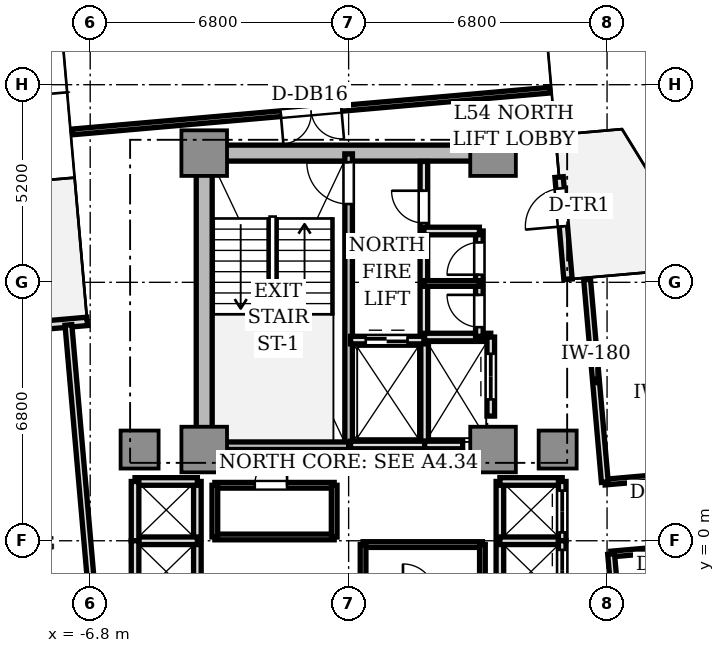
"""IFC4 building model, lengths in metres.
Left out: names, types, materials, properties, quantities, classifications, styles, units other than length and angle.
Written with IfcOpenShell. Run it as: python <this file> out.ifc"""

import sys

from ifc_helpers import new_model, si_unit, direction, frame, frame_2d, origin, origin_2d, place, context, subcontext, project, spatial, rectangle, extrude, source, transform, mapped, element, fill, save


model = new_model("IFC4")
c1 = context("Model", 3, precision=1e-05, world=origin(), true_north=direction((0.0, 1.0)))
c2 = subcontext(c1, "Body", "Model", "MODEL_VIEW")
j1 = project(units=[si_unit("LENGTHUNIT", "METRE"), si_unit("PLANEANGLEUNIT", "RADIAN")], contexts=[c1])
p1 = place(None, origin())
s1 = spatial("IfcSite", under=j1, at=p1, CompositionType="ELEMENT")
p2 = place(p1, origin())
s2 = spatial("IfcBuilding", under=s1, at=p2, CompositionType="ELEMENT")
p3 = place(p2, frame((0.0, 0.0, 195.3)))
s3 = spatial("IfcBuildingStorey", under=s2, at=p3, CompositionType="ELEMENT", Elevation=195.3)
p4 = place(p3, frame((-3.55, 10.2, 0.0), z_axis=(0.0, 0.0, 1.0), x_axis=(1.0, 0.0, 0.0)))
e1 = element("IfcWall", 1, at=p4, inside=s3, PredefinedType="SHEAR", context=c2, shape_type="SweptSolid", body=[
    extrude(rectangle(XDim=7.1, YDim=0.42, at=frame_2d((3.55, 0.0))), origin(), (0.0, 0.0, 1.0), 3.11),
])
p5 = place(p3, frame((-3.8, 2.85, 0.0), z_axis=(0.0, 0.0, 1.0), x_axis=(0.0, 1.0, 0.0)))
e2 = element("IfcWall", 2, at=p5, inside=s3, PredefinedType="SHEAR", context=c2, shape_type="SweptSolid", body=[
    extrude(rectangle(XDim=6.9, YDim=0.42, at=frame_2d((3.45, 0.0))), origin(), (0.0, 0.0, 1.0), 3.11),
])
m1 = source(origin(), c2, "Body", "SweptSolid", [
    extrude(rectangle(XDim=1.2, YDim=1.2, at=origin_2d()), origin(), (0.0, 0.0, 1.0), 3.11),
])
for number, where, z_axis, x_axis in (
    (3, (-3.8, 2.4, 0.0), (0.0, 0.0, 1.0), (1.0, 0.0, 0.0)),
    (4, (3.8, 2.4, 0.0), (0.0, 0.0, 1.0), (1.0, 0.0, 0.0)),
    (5, (-3.8, 10.2, 0.0), (0.0, 0.0, 1.0), (1.0, 0.0, 0.0)),
    (6, (3.8, 10.2, 0.0), (0.0, 0.0, 1.0), (1.0, 0.0, 0.0)),
):
    element("IfcColumn", number, at=place(p3, frame(where, z_axis=z_axis, x_axis=x_axis)), inside=s3, PredefinedType="COLUMN", context=c2, shape_type="MappedRepresentation", body=[
        mapped(m1, transform((0.0, 0.0, 0.0), scale=1.0)),
    ])
m2 = source(origin(), c2, "Body", "SweptSolid", [
    extrude(rectangle(XDim=1.0, YDim=1.0, at=origin_2d()), origin(), (0.0, 0.0, 1.0), 3.11),
])
for number, where, z_axis, x_axis in (
    (7, (5.5, 2.4, 0.0), (0.0, 0.0, 1.0), (1.0, 0.0, 0.0)),
    (8, (-5.5, 2.4, 0.0), (0.0, 0.0, 1.0), (1.0, 0.0, 0.0)),
):
    element("IfcColumn", number, at=place(p3, frame(where, z_axis=z_axis, x_axis=x_axis)), inside=s3, PredefinedType="COLUMN", context=c2, shape_type="MappedRepresentation", body=[
        mapped(m2, transform((0.0, 0.0, 0.0), scale=1.0)),
    ])
p6 = place(p3, frame((5.772, 6.879, 0.0), z_axis=(0.0, 0.0, 1.0), x_axis=(-0.087168071984, 0.996193619346, 0.0)))
e9 = element("IfcWall", 9, at=p6, inside=s3, PredefinedType="STANDARD", context=c2, shape_type="SweptSolid", body=[
    extrude(rectangle(XDim=2.7, YDim=0.22, at=frame_2d((1.35, 0.0))), origin(), (0.0, 0.0, 1.0), 3.11),
])
p7 = place(p6, frame((1.4, 0.0, 0.0)))
e10 = element("IfcOpeningElement", 10, at=p7, cuts=e9, PredefinedType="OPENING", context=c2, shape_type="SweptSolid", body=[
    extrude(rectangle(XDim=1.0, YDim=2.2, at=frame_2d((0.5, 1.1))), frame((0.0, 0.12, 0.0), z_axis=(0.0, -1.0, 0.0), x_axis=(1.0, 0.0, 0.0)), (0.0, 0.0, 1.0), 0.24),
])
p8 = place(p3, frame((-6.879, 5.772, 0.0), z_axis=(0.0, 0.0, 1.0), x_axis=(-0.996193619346, -0.087168071984, 0.0)))
e11 = element("IfcWall", 11, at=p8, inside=s3, PredefinedType="STANDARD", context=c2, shape_type="SweptSolid", body=[
    extrude(rectangle(XDim=2.7, YDim=0.22, at=frame_2d((1.35, 0.0))), origin(), (0.0, 0.0, 1.0), 3.11),
])
p9 = place(p8, frame((1.4, 0.0, 0.0)))
e12 = element("IfcOpeningElement", 12, at=p9, cuts=e11, PredefinedType="OPENING", context=c2, shape_type="SweptSolid", body=[
    extrude(rectangle(XDim=1.0, YDim=2.2, at=frame_2d((0.5, 1.1))), frame((0.0, 0.12, 0.0), z_axis=(0.0, -1.0, 0.0), x_axis=(1.0, 0.0, 0.0)), (0.0, 0.0, 1.0), 0.24),
])
p10 = place(p3, frame((0.0, 2.5, 0.0), z_axis=(0.0, 0.0, 1.0), x_axis=(0.0, 1.0, 0.0)))
e13 = element("IfcWall", 13, at=p10, inside=s3, PredefinedType="SOLIDWALL", context=c2, shape_type="SweptSolid", body=[
    extrude(rectangle(XDim=7.68, YDim=0.2, at=frame_2d((3.84, 0.0))), origin(), (0.0, 0.0, 1.0), 3.11),
])
p11 = place(p10, frame((6.36, 0.0, 0.0)))
e14 = element("IfcOpeningElement", 14, at=p11, cuts=e13, PredefinedType="OPENING", context=c2, shape_type="SweptSolid", body=[
    extrude(rectangle(XDim=1.1, YDim=2.15, at=frame_2d((0.55, 1.075))), frame((0.0, 0.11, 0.0), z_axis=(0.0, -1.0, 0.0), x_axis=(1.0, 0.0, 0.0)), (0.0, 0.0, 1.0), 0.22),
])
p12 = place(p3, frame((-3.72, 2.5, 0.0), z_axis=(0.0, 0.0, 1.0), x_axis=(1.0, 0.0, 0.0)))
e15 = element("IfcWall", 15, at=p12, inside=s3, PredefinedType="SOLIDWALL", context=c2, shape_type="SweptSolid", body=[
    extrude(rectangle(XDim=3.72, YDim=0.2, at=frame_2d((1.86, 0.0))), origin(), (0.0, 0.0, 1.0), 3.11),
])
p13 = place(p3, frame((1.98, 5.32, 0.0), z_axis=(0.0, 0.0, 1.0), x_axis=(0.0, 1.0, 0.0)))
e16 = element("IfcWall", 16, at=p13, inside=s3, PredefinedType="SOLIDWALL", context=c2, shape_type="SweptSolid", body=[
    extrude(rectangle(XDim=4.66, YDim=0.2, at=frame_2d((2.33, 0.0))), origin(), (0.0, 0.0, 1.0), 2.66),
])
p14 = place(p13, frame((3.04, 0.0, 0.0)))
e17 = element("IfcOpeningElement", 17, at=p14, cuts=e16, PredefinedType="OPENING", context=c2, shape_type="SweptSolid", body=[
    extrude(rectangle(XDim=0.85, YDim=2.1, at=frame_2d((0.425, 1.05))), frame((0.0, 0.11, 0.0), z_axis=(0.0, -1.0, 0.0), x_axis=(1.0, 0.0, 0.0)), (0.0, 0.0, 1.0), 0.22),
])
p15 = place(p3, frame((2.0, 2.5, 0.0), z_axis=(0.0, 0.0, 1.0), x_axis=(0.0, 1.0, 0.0)))
e18 = element("IfcWall", 18, at=p15, inside=s3, PredefinedType="SOLIDWALL", context=c2, shape_type="SweptSolid", body=[
    extrude(rectangle(XDim=2.78, YDim=0.2, at=frame_2d((1.39, 0.0))), origin(), (0.0, 0.0, 1.0), 2.66),
])
p16 = place(p3, frame((0.05, 2.52, 0.0), z_axis=(0.0, 0.0, 1.0), x_axis=(1.0, 0.0, 0.0)))
e19 = element("IfcWall", 19, at=p16, inside=s3, PredefinedType="SOLIDWALL", context=c2, shape_type="SweptSolid", body=[
    extrude(rectangle(XDim=1.95, YDim=0.2, at=frame_2d((0.975, 0.0))), origin(), (0.0, 0.0, 1.0), 2.66),
])
p17 = place(p3, frame((0.05, 5.28, 0.0), z_axis=(0.0, 0.0, 1.0), x_axis=(1.0, 0.0, 0.0)))
e20 = element("IfcWall", 20, at=p17, inside=s3, PredefinedType="SOLIDWALL", context=c2, shape_type="SweptSolid", body=[
    extrude(rectangle(XDim=1.93, YDim=0.2, at=frame_2d((0.965, 0.0))), origin(), (0.0, 0.0, 1.0), 2.66),
])
p18 = place(p17, frame((0.4, 0.0, 0.0)))
e21 = element("IfcOpeningElement", 21, at=p18, cuts=e20, PredefinedType="OPENING", context=c2, shape_type="SweptSolid", body=[
    extrude(rectangle(XDim=1.1, YDim=2.2, at=frame_2d((0.55, 1.1))), frame((0.0, 0.11, 0.0), z_axis=(0.0, -1.0, 0.0), x_axis=(1.0, 0.0, 0.0)), (0.0, 0.0, 1.0), 0.22),
])
p19 = place(p3, frame((2.0, 2.52, 0.0), z_axis=(0.0, 0.0, 1.0), x_axis=(1.0, 0.0, 0.0)))
e22 = element("IfcWall", 22, at=p19, inside=s3, PredefinedType="SOLIDWALL", context=c2, shape_type="SweptSolid", body=[
    extrude(rectangle(XDim=1.0, YDim=0.2, at=frame_2d((0.5, 0.0))), origin(), (0.0, 0.0, 1.0), 2.66),
])
p20 = place(p3, frame((2.0, 5.36, 0.0), z_axis=(0.0, 0.0, 1.0), x_axis=(1.0, 0.0, 0.0)))
e23 = element("IfcWall", 23, at=p20, inside=s3, PredefinedType="SOLIDWALL", context=c2, shape_type="SweptSolid", body=[
    extrude(rectangle(XDim=1.74, YDim=0.2, at=frame_2d((0.87, 0.0))), origin(), (0.0, 0.0, 1.0), 2.66),
])
p21 = place(p3, frame((3.74, 3.28, 0.0), z_axis=(0.0, 0.0, 1.0), x_axis=(0.0, 1.0, 0.0)))
e24 = element("IfcWall", 24, at=p21, inside=s3, PredefinedType="SOLIDWALL", context=c2, shape_type="SweptSolid", body=[
    extrude(rectangle(XDim=2.08, YDim=0.2, at=frame_2d((1.04, 0.0))), origin(), (0.0, 0.0, 1.0), 2.66),
])
p22 = place(p21, frame((0.44, 0.0, 0.0)))
e25 = element("IfcOpeningElement", 25, at=p22, cuts=e24, PredefinedType="OPENING", context=c2, shape_type="SweptSolid", body=[
    extrude(rectangle(XDim=1.2, YDim=2.2, at=frame_2d((0.6, 1.1))), frame((0.0, 0.11, 0.0), z_axis=(0.0, -1.0, 0.0), x_axis=(1.0, 0.0, 0.0)), (0.0, 0.0, 1.0), 0.22),
])
p23 = place(p3, frame((3.98, -1.56, 0.0), z_axis=(0.0, 0.0, 1.0), x_axis=(0.0, 1.0, 0.0)))
e26 = element("IfcWall", 26, at=p23, inside=s3, PredefinedType="SOLIDWALL", context=c2, shape_type="SweptSolid", body=[
    extrude(rectangle(XDim=3.12, YDim=0.2, at=frame_2d((1.56, 0.0))), origin(), (0.0, 0.0, 1.0), 2.28),
])
for number, where, z_axis, x_axis in (
    (27, (3.98, 1.56, 0.0), (0.0, 0.0, 1.0), (1.0, 0.0, 0.0)),
    (28, (3.98, 0.0, 0.0), (0.0, 0.0, 1.0), (1.0, 0.0, 0.0)),
):
    element("IfcWall", number, at=place(p3, frame(where, z_axis=z_axis, x_axis=x_axis)), inside=s3, PredefinedType="SOLIDWALL", context=c2, shape_type="SweptSolid", body=[
        extrude(rectangle(XDim=1.64, YDim=0.2, at=frame_2d((0.82, 0.0))), origin(), (0.0, 0.0, 1.0), 2.66),
    ])
p24 = place(p3, frame((5.62, 0.0, 0.0), z_axis=(0.0, 0.0, 1.0), x_axis=(0.0, 1.0, 0.0)))
e29 = element("IfcWall", 29, at=p24, inside=s3, PredefinedType="SOLIDWALL", context=c2, shape_type="SweptSolid", body=[
    extrude(rectangle(XDim=1.56, YDim=0.2, at=frame_2d((0.78, 0.0))), origin(), (0.0, 0.0, 1.0), 2.66),
])
p25 = place(p24, frame((0.22, 0.0, 0.0)))
e30 = element("IfcOpeningElement", 30, at=p25, cuts=e29, PredefinedType="OPENING", context=c2, shape_type="SweptSolid", body=[
    extrude(rectangle(XDim=1.1, YDim=2.2, at=frame_2d((0.55, 1.1))), frame((0.0, 0.11, 0.0), z_axis=(0.0, -1.0, 0.0), x_axis=(1.0, 0.0, 0.0)), (0.0, 0.0, 1.0), 0.22),
])
p26 = place(p3, frame((5.62, -1.56, 0.0), z_axis=(0.0, 0.0, 1.0), x_axis=(0.0, 1.0, 0.0)))
e31 = element("IfcWall", 31, at=p26, inside=s3, PredefinedType="SOLIDWALL", context=c2, shape_type="SweptSolid", body=[
    extrude(rectangle(XDim=1.56, YDim=0.2, at=frame_2d((0.78, 0.0))), origin(), (0.0, 0.0, 1.0), 2.66),
])
p27 = place(p26, frame((0.22, 0.0, 0.0)))
e32 = element("IfcOpeningElement", 32, at=p27, cuts=e31, PredefinedType="OPENING", context=c2, shape_type="SweptSolid", body=[
    extrude(rectangle(XDim=1.1, YDim=2.2, at=frame_2d((0.55, 1.1))), frame((0.0, 0.11, 0.0), z_axis=(0.0, -1.0, 0.0), x_axis=(1.0, 0.0, 0.0)), (0.0, 0.0, 1.0), 0.22),
])
p28 = place(p3, frame((-3.98, -1.56, 0.0), z_axis=(0.0, 0.0, 1.0), x_axis=(0.0, 1.0, 0.0)))
e33 = element("IfcWall", 33, at=p28, inside=s3, PredefinedType="SOLIDWALL", context=c2, shape_type="SweptSolid", body=[
    extrude(rectangle(XDim=3.12, YDim=0.2, at=frame_2d((1.56, 0.0))), origin(), (0.0, 0.0, 1.0), 2.28),
])
for number, where, z_axis, x_axis in (
    (34, (-5.62, 1.56, 0.0), (0.0, 0.0, 1.0), (1.0, 0.0, 0.0)),
    (35, (-5.62, 0.0, 0.0), (0.0, 0.0, 1.0), (1.0, 0.0, 0.0)),
):
    element("IfcWall", number, at=place(p3, frame(where, z_axis=z_axis, x_axis=x_axis)), inside=s3, PredefinedType="SOLIDWALL", context=c2, shape_type="SweptSolid", body=[
        extrude(rectangle(XDim=1.64, YDim=0.2, at=frame_2d((0.82, 0.0))), origin(), (0.0, 0.0, 1.0), 2.66),
    ])
for number, where, z_axis, x_axis in (
    (36, (-5.62, 0.0, 0.0), (0.0, 0.0, 1.0), (0.0, 1.0, 0.0)),
    (37, (-5.62, -1.56, 0.0), (0.0, 0.0, 1.0), (0.0, 1.0, 0.0)),
):
    element("IfcWall", number, at=place(p3, frame(where, z_axis=z_axis, x_axis=x_axis)), inside=s3, PredefinedType="SOLIDWALL", context=c2, shape_type="SweptSolid", body=[
        extrude(rectangle(XDim=1.56, YDim=0.2, at=frame_2d((0.78, 0.0))), origin(), (0.0, 0.0, 1.0), 2.66),
    ])
p29 = place(p3, frame((3.44, 5.38, 0.0), z_axis=(0.0, 0.0, 1.0), x_axis=(0.0, 1.0, 0.0)))
e38 = element("IfcWall", 38, at=p29, inside=s3, PredefinedType="SOLIDWALL", context=c2, shape_type="SweptSolid", body=[
    extrude(rectangle(XDim=2.77, YDim=0.2, at=frame_2d((1.385, 0.0))), origin(), (0.0, 0.0, 1.0), 2.66),
])
p30 = place(p29, frame((0.24, 0.0, 0.0)))
e39 = element("IfcOpeningElement", 39, at=p30, cuts=e38, PredefinedType="OPENING", context=c2, shape_type="SweptSolid", body=[
    extrude(rectangle(XDim=0.85, YDim=2.1, at=frame_2d((0.425, 1.05))), frame((0.0, 0.11, 0.0), z_axis=(0.0, -1.0, 0.0), x_axis=(1.0, 0.0, 0.0)), (0.0, 0.0, 1.0), 0.22),
])
p31 = place(p29, frame((1.62, 0.0, 0.0)))
e40 = element("IfcOpeningElement", 40, at=p31, cuts=e38, PredefinedType="OPENING", context=c2, shape_type="SweptSolid", body=[
    extrude(rectangle(XDim=0.85, YDim=2.1, at=frame_2d((0.425, 1.05))), frame((0.0, 0.11, 0.0), z_axis=(0.0, -1.0, 0.0), x_axis=(1.0, 0.0, 0.0)), (0.0, 0.0, 1.0), 0.22),
])
p32 = place(p3, frame((1.98, 8.15, 0.0), z_axis=(0.0, 0.0, 1.0), x_axis=(1.0, 0.0, 0.0)))
e41 = element("IfcWall", 41, at=p32, inside=s3, PredefinedType="SOLIDWALL", context=c2, shape_type="SweptSolid", body=[
    extrude(rectangle(XDim=1.46, YDim=0.2, at=frame_2d((0.73, 0.0))), origin(), (0.0, 0.0, 1.0), 2.66),
])
p33 = place(p3, frame((1.98, 6.77, 0.0), z_axis=(0.0, 0.0, 1.0), x_axis=(1.0, 0.0, 0.0)))
e42 = element("IfcWall", 42, at=p33, inside=s3, PredefinedType="PARTITIONING", context=c2, shape_type="SweptSolid", body=[
    extrude(rectangle(XDim=1.46, YDim=0.15, at=frame_2d((0.73, 0.0))), origin(), (0.0, 0.0, 1.0), 2.66),
])
p34 = place(p3, frame((-3.52, 0.1, 0.0), z_axis=(0.0, 0.0, 1.0), x_axis=(1.0, 0.0, 0.0)))
e43 = element("IfcWall", 43, at=p34, inside=s3, PredefinedType="PARTITIONING", context=c2, shape_type="SweptSolid", body=[
    extrude(rectangle(XDim=3.14, YDim=0.15, at=frame_2d((1.57, 0.0))), origin(), (0.0, 0.0, 1.0), 2.66),
])
p35 = place(p3, frame((-3.52, 1.46, 0.0), z_axis=(0.0, 0.0, 1.0), x_axis=(1.0, 0.0, 0.0)))
e44 = element("IfcWall", 44, at=p35, inside=s3, PredefinedType="PARTITIONING", context=c2, shape_type="SweptSolid", body=[
    extrude(rectangle(XDim=3.14, YDim=0.15, at=frame_2d((1.57, 0.0))), origin(), (0.0, 0.0, 1.0), 2.66),
])
p36 = place(p35, frame((1.05, 0.0, 0.0)))
e45 = element("IfcOpeningElement", 45, at=p36, cuts=e44, PredefinedType="OPENING", context=c2, shape_type="SweptSolid", body=[
    extrude(rectangle(XDim=0.85, YDim=2.1, at=frame_2d((0.425, 1.05))), frame((0.0, 0.085, 0.0), z_axis=(0.0, -1.0, 0.0), x_axis=(1.0, 0.0, 0.0)), (0.0, 0.0, 1.0), 0.17),
])
p37 = place(p3, frame((-3.52, 0.1, 0.0), z_axis=(0.0, 0.0, 1.0), x_axis=(0.0, 1.0, 0.0)))
e46 = element("IfcWall", 46, at=p37, inside=s3, PredefinedType="PARTITIONING", context=c2, shape_type="SweptSolid", body=[
    extrude(rectangle(XDim=1.36, YDim=0.15, at=frame_2d((0.68, 0.0))), origin(), (0.0, 0.0, 1.0), 2.28),
])
p38 = place(p3, frame((-0.38, 0.1, 0.0), z_axis=(0.0, 0.0, 1.0), x_axis=(0.0, 1.0, 0.0)))
e47 = element("IfcWall", 47, at=p38, inside=s3, PredefinedType="PARTITIONING", context=c2, shape_type="SweptSolid", body=[
    extrude(rectangle(XDim=1.36, YDim=0.15, at=frame_2d((0.68, 0.0))), origin(), (0.0, 0.0, 1.0), 2.66),
])
p39 = place(p3, frame((0.38, -0.1, 0.0), z_axis=(0.0, 0.0, 1.0), x_axis=(1.0, 0.0, 0.0)))
e48 = element("IfcWall", 48, at=p39, inside=s3, PredefinedType="PARTITIONING", context=c2, shape_type="SweptSolid", body=[
    extrude(rectangle(XDim=3.14, YDim=0.15, at=frame_2d((1.57, 0.0))), origin(), (0.0, 0.0, 1.0), 2.66),
])
p40 = place(p3, frame((0.38, -1.46, 0.0), z_axis=(0.0, 0.0, 1.0), x_axis=(0.0, 1.0, 0.0)))
e49 = element("IfcWall", 49, at=p40, inside=s3, PredefinedType="PARTITIONING", context=c2, shape_type="SweptSolid", body=[
    extrude(rectangle(XDim=1.36, YDim=0.15, at=frame_2d((0.68, 0.0))), origin(), (0.0, 0.0, 1.0), 2.66),
])
p41 = place(p3, frame((3.52, -1.46, 0.0), z_axis=(0.0, 0.0, 1.0), x_axis=(0.0, 1.0, 0.0)))
e50 = element("IfcWall", 50, at=p41, inside=s3, PredefinedType="PARTITIONING", context=c2, shape_type="SweptSolid", body=[
    extrude(rectangle(XDim=1.36, YDim=0.15, at=frame_2d((0.68, 0.0))), origin(), (0.0, 0.0, 1.0), 2.28),
])
p42 = place(p3, frame((6.741, 1.543, 0.0), z_axis=(0.0, 0.0, 1.0), x_axis=(0.996193954812, 0.087164238054, 0.0)))
e51 = element("IfcWall", 51, at=p42, inside=s3, PredefinedType="PARTITIONING", context=c2, shape_type="SweptSolid", body=[
    extrude(rectangle(XDim=3.35, YDim=0.15, at=frame_2d((1.675, 0.0))), origin(), (0.0, 0.0, 1.0), 2.66),
])
p43 = place(p42, frame((1.2, 0.0, 0.0)))
e52 = element("IfcOpeningElement", 52, at=p43, cuts=e51, PredefinedType="OPENING", context=c2, shape_type="SweptSolid", body=[
    extrude(rectangle(XDim=0.85, YDim=2.1, at=frame_2d((0.425, 1.05))), frame((0.0, 0.085, 0.0), z_axis=(0.0, -1.0, 0.0), x_axis=(1.0, 0.0, 0.0)), (0.0, 0.0, 1.0), 0.17),
])
p44 = place(p3, frame((6.907, -0.349, 0.0), z_axis=(0.0, 0.0, 1.0), x_axis=(0.996193954812, 0.087164238054, 0.0)))
e53 = element("IfcWall", 53, at=p44, inside=s3, PredefinedType="PARTITIONING", context=c2, shape_type="SweptSolid", body=[
    extrude(rectangle(XDim=3.35, YDim=0.15, at=frame_2d((1.675, 0.0))), origin(), (0.0, 0.0, 1.0), 2.66),
])
p45 = place(p44, frame((1.2, 0.0, 0.0)))
e54 = element("IfcOpeningElement", 54, at=p45, cuts=e53, PredefinedType="OPENING", context=c2, shape_type="SweptSolid", body=[
    extrude(rectangle(XDim=0.85, YDim=2.1, at=frame_2d((0.425, 1.05))), frame((0.0, 0.085, 0.0), z_axis=(0.0, -1.0, 0.0), x_axis=(1.0, 0.0, 0.0)), (0.0, 0.0, 1.0), 0.17),
])
for number, where, z_axis, x_axis in (
    (55, (6.741, 1.543, 0.0), (0.0, 0.0, 1.0), (-0.087, 0.996, 0.0)),
    (56, (7.373, -5.679, 0.0), (0.0, 0.0, 1.0), (-0.087, 0.996, 0.0)),
):
    element("IfcWall", number, at=place(p3, frame(where, z_axis=z_axis, x_axis=x_axis)), inside=s3, PredefinedType="PARTITIONING", context=c2, shape_type="SweptSolid", body=[
        extrude(rectangle(XDim=5.35, YDim=0.18, at=frame_2d((2.675, 0.0))), origin(), (0.0, 0.0, 1.0), 2.66),
    ])
p46 = place(p3, frame((5.287, 11.856, 0.0), z_axis=(0.0, 0.0, 1.0), x_axis=(-0.996194790044, -0.087154691724, 0.0)))
e57 = element("IfcWall", 57, at=p46, inside=s3, PredefinedType="PARTITIONING", context=c2, shape_type="SweptSolid", body=[
    extrude(rectangle(XDim=12.6, YDim=0.15, at=frame_2d((6.3, 0.0))), origin(), (0.0, 0.0, 1.0), 2.66),
])
p47 = place(p46, frame((5.5, 0.0, 0.0)))
e58 = element("IfcOpeningElement", 58, at=p47, cuts=e57, PredefinedType="OPENING", context=c2, shape_type="SweptSolid", body=[
    extrude(rectangle(XDim=1.6, YDim=2.25, at=frame_2d((0.8, 1.125))), frame((0.0, 0.085, 0.0), z_axis=(0.0, -1.0, 0.0), x_axis=(1.0, 0.0, 0.0)), (0.0, 0.0, 1.0), 0.17),
])
p48 = place(p3, frame((-7.373, 5.679, 0.0), z_axis=(0.0, 0.0, 1.0), x_axis=(0.087163455754, -0.996194023261, 0.0)))
e59 = element("IfcWall", 59, at=p48, inside=s3, PredefinedType="PARTITIONING", context=c2, shape_type="SweptSolid", body=[
    extrude(rectangle(XDim=10.4, YDim=0.18, at=frame_2d((5.2, 0.0))), origin(), (0.0, 0.0, 1.0), 2.66),
])
m3 = source(origin(), c2, "Body", "SweptSolid", [
    extrude(rectangle(XDim=1.0, YDim=0.05, at=origin_2d()), origin(), (0.0, 0.0, 1.0), 2.2),
])
p49 = place(p7, frame((0.5, 0.0, 0.0)))
e60 = element("IfcDoor", 60, at=p49, inside=s3, OperationType="SINGLE_SWING_LEFT", PredefinedType="DOOR", context=c2, shape_type="MappedRepresentation", body=[
    mapped(m3, transform((0.0, 0.0, 0.0), scale=1.0)),
])
fill(e10, e60)
m4 = source(origin(), c2, "Body", "SweptSolid", [
    extrude(rectangle(XDim=1.1, YDim=0.05, at=origin_2d()), origin(), (0.0, 0.0, 1.0), 2.15),
])
p50 = place(p11, frame((0.55, 0.0, 0.0)))
e61 = element("IfcDoor", 61, at=p50, inside=s3, OperationType="SINGLE_SWING_RIGHT", PredefinedType="DOOR", context=c2, shape_type="MappedRepresentation", body=[
    mapped(m4, transform((0.0, 0.0, 0.0), scale=1.0)),
])
fill(e14, e61)
m5 = source(origin(), c2, "Body", "SweptSolid", [
    extrude(rectangle(XDim=0.85, YDim=0.05, at=origin_2d()), origin(), (0.0, 0.0, 1.0), 2.1),
])
p51 = place(p14, frame((0.425, 0.0, 0.0)))
e62 = element("IfcDoor", 62, at=p51, inside=s3, OperationType="SINGLE_SWING_RIGHT", PredefinedType="DOOR", context=c2, shape_type="MappedRepresentation", body=[
    mapped(m5, transform((0.0, 0.0, 0.0), scale=1.0)),
])
fill(e17, e62)
m6 = source(origin(), c2, "Body", "SweptSolid", [
    extrude(rectangle(XDim=1.1, YDim=0.05, at=origin_2d()), origin(), (0.0, 0.0, 1.0), 2.2),
])
p52 = place(p18, frame((0.55, 0.0, 0.0)))
e63 = element("IfcDoor", 63, at=p52, inside=s3, OperationType="DOUBLE_DOOR_SLIDING", PredefinedType="DOOR", context=c2, shape_type="MappedRepresentation", body=[
    mapped(m6, transform((0.0, 0.0, 0.0), scale=1.0)),
])
fill(e21, e63)
m7 = source(origin(), c2, "Body", "SweptSolid", [
    extrude(rectangle(XDim=1.2, YDim=0.05, at=origin_2d()), origin(), (0.0, 0.0, 1.0), 2.2),
])
p53 = place(p22, frame((0.6, 0.0, 0.0)))
e64 = element("IfcDoor", 64, at=p53, inside=s3, OperationType="DOUBLE_DOOR_SLIDING", PredefinedType="DOOR", context=c2, shape_type="MappedRepresentation", body=[
    mapped(m7, transform((0.0, 0.0, 0.0), scale=1.0)),
])
fill(e25, e64)
p54 = place(p25, frame((0.55, 0.0, 0.0)))
e65 = element("IfcDoor", 65, at=p54, inside=s3, OperationType="DOUBLE_DOOR_SLIDING", PredefinedType="DOOR", context=c2, shape_type="MappedRepresentation", body=[
    mapped(m6, transform((0.0, 0.0, 0.0), scale=1.0)),
])
fill(e30, e65)
p55 = place(p27, frame((0.55, 0.0, 0.0)))
e66 = element("IfcDoor", 66, at=p55, inside=s3, OperationType="DOUBLE_DOOR_SLIDING", PredefinedType="DOOR", context=c2, shape_type="MappedRepresentation", body=[
    mapped(m6, transform((0.0, 0.0, 0.0), scale=1.0)),
])
fill(e32, e66)
p56 = place(p30, frame((0.425, 0.0, 0.0)))
e67 = element("IfcDoor", 67, at=p56, inside=s3, OperationType="SINGLE_SWING_RIGHT", PredefinedType="DOOR", context=c2, shape_type="MappedRepresentation", body=[
    mapped(m5, transform((0.0, 0.0, 0.0), scale=1.0)),
])
fill(e39, e67)
p57 = place(p31, frame((0.425, 0.0, 0.0)))
e68 = element("IfcDoor", 68, at=p57, inside=s3, OperationType="SINGLE_SWING_LEFT", PredefinedType="DOOR", context=c2, shape_type="MappedRepresentation", body=[
    mapped(m5, transform((0.0, 0.0, 0.0), scale=1.0)),
])
fill(e40, e68)
p58 = place(p36, frame((0.425, 0.0, 0.0)))
e69 = element("IfcDoor", 69, at=p58, inside=s3, OperationType="SINGLE_SWING_RIGHT", PredefinedType="DOOR", context=c2, shape_type="MappedRepresentation", body=[
    mapped(m5, transform((0.0, 0.0, 0.0), scale=1.0)),
])
fill(e45, e69)
m8 = source(origin(), c2, "Body", "SweptSolid", [
    extrude(rectangle(XDim=1.6, YDim=0.05, at=origin_2d()), origin(), (0.0, 0.0, 1.0), 2.25),
])
p59 = place(p47, frame((0.8, 0.0, 0.0)))
e70 = element("IfcDoor", 70, at=p59, inside=s3, OperationType="DOUBLE_DOOR_SINGLE_SWING", PredefinedType="DOOR", context=c2, shape_type="MappedRepresentation", body=[
    mapped(m8, transform((0.0, 0.0, 0.0), scale=1.0)),
])
fill(e58, e70)
save(model, sys.argv[1])
